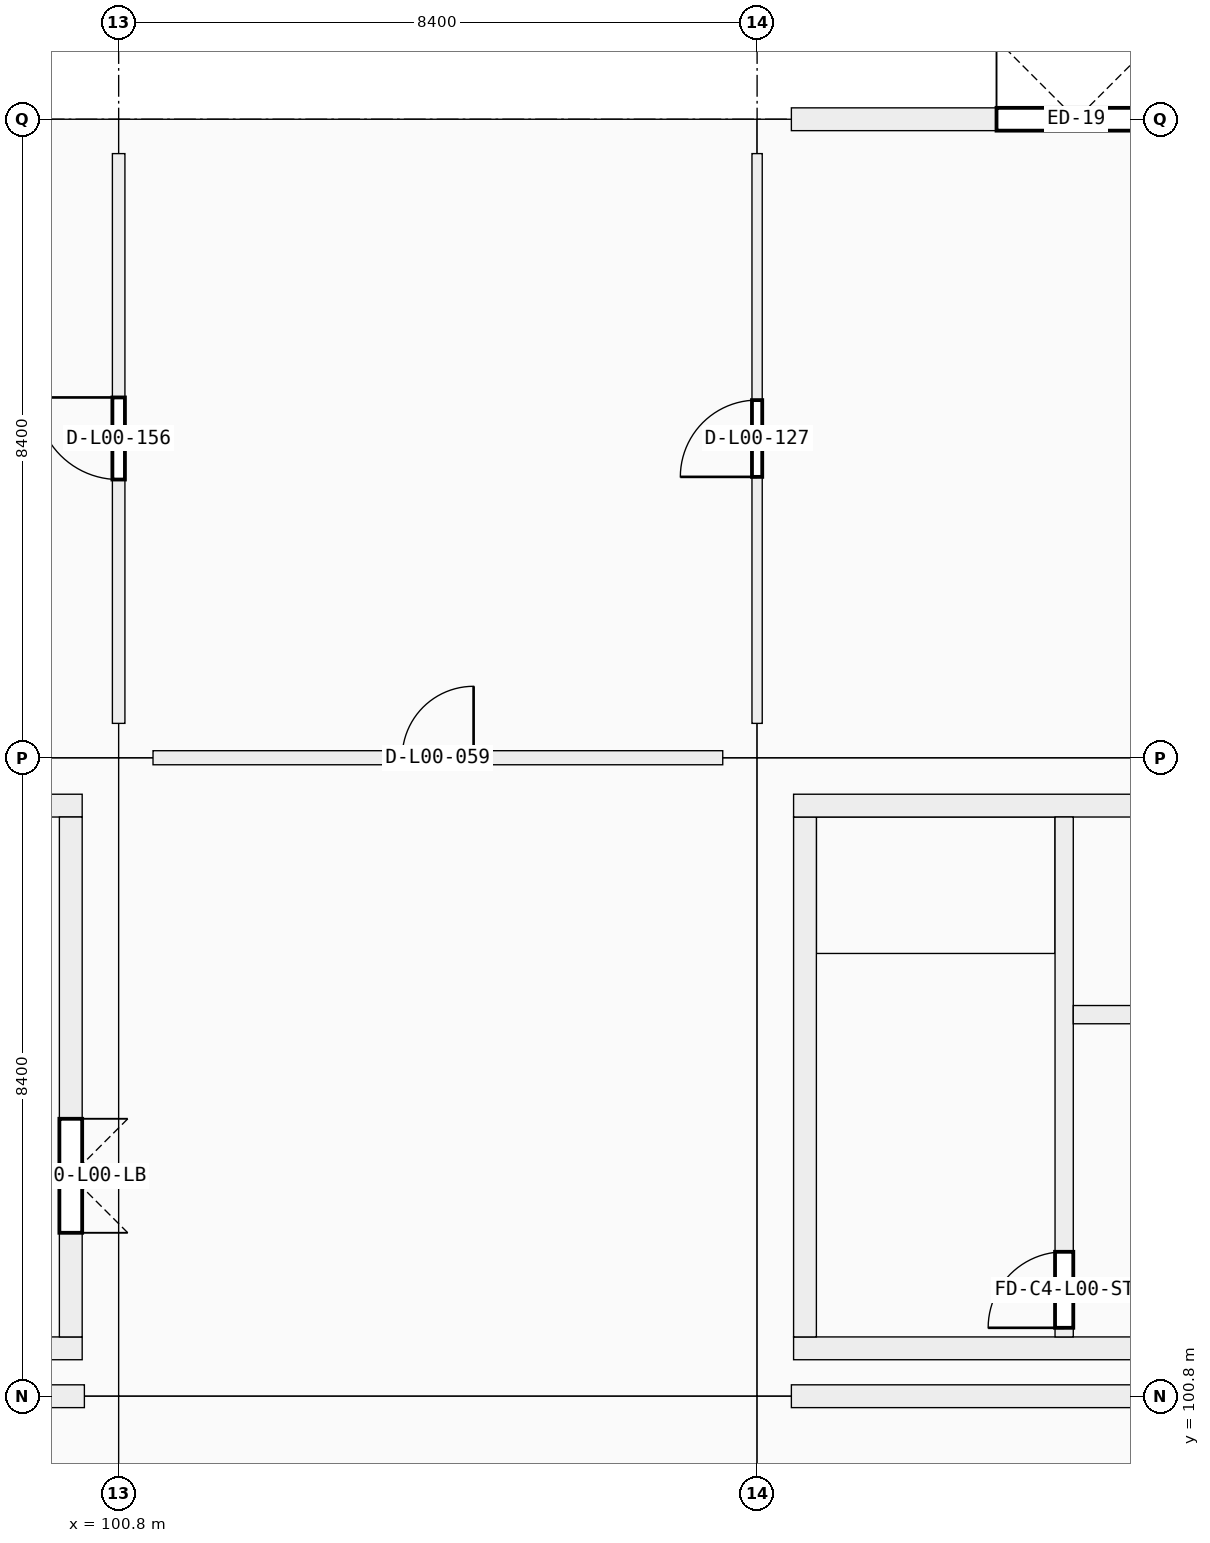
"""IFC4 building model, lengths in metres.
Left out: names, types, materials, properties, quantities, classifications, styles, units other than length and angle.
Written with IfcOpenShell. Run it as: python <this file> out.ifc"""

import sys

from ifc_helpers import new_model, si_unit, direction, frame, frame_2d, origin, origin_2d, place, context, subcontext, project, spatial, rectangle, extrude, element, fill, save


model = new_model("IFC4")
c1 = context("Model", 3, precision=1e-05, world=origin(), true_north=direction((0.0, 1.0)))
c2 = subcontext(c1, "Body", "Model", "MODEL_VIEW")
j1 = project(units=[si_unit("LENGTHUNIT", "METRE"), si_unit("PLANEANGLEUNIT", "RADIAN")], contexts=[c1])
p1 = place(None, origin())
s1 = spatial("IfcSite", under=j1, at=p1, CompositionType="ELEMENT")
p2 = place(p1, origin())
s2 = spatial("IfcBuilding", under=s1, at=p2, CompositionType="ELEMENT")
p3 = place(p2, origin())
s3 = spatial("IfcBuildingStorey", under=s2, at=p3, CompositionType="ELEMENT", Elevation=0.0)
for number, where, z_axis, x_axis in (
    (1, (100.8, 100.8, 0.0), (0.0, 0.0, 1.0), (1.0, 0.0, 0.0)),
    (2, (100.8, 109.2, 0.0), (0.0, 0.0, 1.0), (1.0, 0.0, 0.0)),
    (3, (100.8, 117.6, 0.0), (0.0, 0.0, 1.0), (1.0, 0.0, 0.0)),
    (4, (109.2, 100.8, 0.0), (0.0, 0.0, 1.0), (1.0, 0.0, 0.0)),
    (5, (109.2, 109.2, 0.0), (0.0, 0.0, 1.0), (1.0, 0.0, 0.0)),
    (6, (109.2, 117.6, 0.0), (0.0, 0.0, 1.0), (1.0, 0.0, 0.0)),
):
    element("IfcColumn", number, at=place(p3, frame(where, z_axis=z_axis, x_axis=x_axis)), inside=s3, PredefinedType="COLUMN", context=c2, shape_type="SweptSolid", body=[
        extrude(rectangle(XDim=0.9, YDim=0.9, at=origin_2d()), origin(), (0.0, 0.0, 1.0), 5.76),
    ])
for number, where, z_axis, x_axis in (
    (7, (100.349, 100.8, 0.0), (0.0, 0.0, 1.0), (-1.0, 0.0, 0.0)),
    (8, (117.149, 100.8, 0.0), (0.0, 0.0, 1.0), (-1.0, 0.0, 0.0)),
):
    element("IfcWall", number, at=place(p3, frame(where, z_axis=z_axis, x_axis=x_axis)), inside=s3, PredefinedType="SOLIDWALL", context=c2, shape_type="SweptSolid", body=[
        extrude(rectangle(XDim=7.498, YDim=0.3, at=frame_2d((3.749, 0.0))), origin(), (0.0, 0.0, 1.0), 4.7),
    ])
p4 = place(p3, frame((109.651, 117.6, 0.0), z_axis=(0.0, 0.0, 1.0), x_axis=(1.0, 0.0, 0.0)))
e9 = element("IfcWall", 9, at=p4, inside=s3, PredefinedType="SOLIDWALL", context=c2, shape_type="SweptSolid", body=[
    extrude(rectangle(XDim=7.498, YDim=0.3, at=frame_2d((3.749, 0.0))), origin(), (0.0, 0.0, 1.0), 4.7),
])
p5 = place(p4, frame((2.699, 0.0, 0.0)))
e10 = element("IfcOpeningElement", 10, at=p5, cuts=e9, PredefinedType="OPENING", context=c2, shape_type="SweptSolid", body=[
    extrude(rectangle(XDim=2.1, YDim=2.25, at=frame_2d((1.05, 1.125))), frame((0.0, 0.15, 0.0), z_axis=(0.0, -1.0, 0.0), x_axis=(1.0, 0.0, 0.0)), (0.0, 0.0, 1.0), 0.3),
])
p6 = place(p3, frame((117.12, 101.43, 0.0), z_axis=(0.0, 0.0, 1.0), x_axis=(-1.0, 0.0, 0.0)))
e11 = element("IfcWall", 11, at=p6, inside=s3, PredefinedType="SHEAR", context=c2, shape_type="SweptSolid", body=[
    extrude(rectangle(XDim=7.44, YDim=0.3, at=frame_2d((3.72, 0.0))), origin(), (0.0, 0.0, 1.0), 5.76),
])
p7 = place(p3, frame((109.83, 101.58, 0.0), z_axis=(0.0, 0.0, 1.0), x_axis=(0.0, 1.0, 0.0)))
e12 = element("IfcWall", 12, at=p7, inside=s3, PredefinedType="SHEAR", context=c2, shape_type="SweptSolid", body=[
    extrude(rectangle(XDim=6.84, YDim=0.3, at=frame_2d((3.42, 0.0))), origin(), (0.0, 0.0, 1.0), 5.76),
])
p8 = place(p3, frame((109.68, 108.57, 0.0), z_axis=(0.0, 0.0, 1.0), x_axis=(1.0, 0.0, 0.0)))
e13 = element("IfcWall", 13, at=p8, inside=s3, PredefinedType="SHEAR", context=c2, shape_type="SweptSolid", body=[
    extrude(rectangle(XDim=7.44, YDim=0.3, at=frame_2d((3.72, 0.0))), origin(), (0.0, 0.0, 1.0), 5.76),
])
p9 = place(p3, frame((113.24, 101.58, 0.0), z_axis=(0.0, 0.0, 1.0), x_axis=(0.0, 1.0, 0.0)))
e14 = element("IfcWall", 14, at=p9, inside=s3, PredefinedType="SHEAR", context=c2, shape_type="SweptSolid", body=[
    extrude(rectangle(XDim=6.84, YDim=0.24, at=frame_2d((3.42, 0.0))), origin(), (0.0, 0.0, 1.0), 5.76),
])
p10 = place(p9, frame((0.12, 0.0, 0.0)))
e15 = element("IfcOpeningElement", 15, at=p10, cuts=e14, PredefinedType="OPENING", context=c2, shape_type="SweptSolid", body=[
    extrude(rectangle(XDim=1.0, YDim=2.15, at=frame_2d((0.5, 1.075))), frame((0.0, 0.12, 0.0), z_axis=(0.0, -1.0, 0.0), x_axis=(1.0, 0.0, 0.0)), (0.0, 0.0, 1.0), 0.24),
])
p11 = place(p3, frame((113.36, 105.82, 0.0), z_axis=(0.0, 0.0, 1.0), x_axis=(1.0, 0.0, 0.0)))
e16 = element("IfcWall", 16, at=p11, inside=s3, PredefinedType="SHEAR", context=c2, shape_type="SweptSolid", body=[
    extrude(rectangle(XDim=3.46, YDim=0.24, at=frame_2d((1.73, 0.0))), origin(), (0.0, 0.0, 1.0), 5.76),
])
p12 = place(p11, frame((1.13, 0.0, 0.0)))
e17 = element("IfcOpeningElement", 17, at=p12, cuts=e16, PredefinedType="OPENING", context=c2, shape_type="SweptSolid", body=[
    extrude(rectangle(XDim=1.2, YDim=2.2, at=frame_2d((0.6, 1.1))), frame((0.0, 0.12, 0.0), z_axis=(0.0, -1.0, 0.0), x_axis=(1.0, 0.0, 0.0)), (0.0, 0.0, 1.0), 0.24),
])
for number, where, z_axis, x_axis in (
    (18, (100.32, 101.43, 0.0), (0.0, 0.0, 1.0), (-1.0, 0.0, 0.0)),
    (19, (92.88, 108.57, 0.0), (0.0, 0.0, 1.0), (1.0, 0.0, 0.0)),
):
    element("IfcWall", number, at=place(p3, frame(where, z_axis=z_axis, x_axis=x_axis)), inside=s3, PredefinedType="SHEAR", context=c2, shape_type="SweptSolid", body=[
        extrude(rectangle(XDim=7.44, YDim=0.3, at=frame_2d((3.72, 0.0))), origin(), (0.0, 0.0, 1.0), 5.76),
    ])
p13 = place(p3, frame((100.17, 108.42, 0.0), z_axis=(0.0, 0.0, 1.0), x_axis=(0.0, -1.0, 0.0)))
e20 = element("IfcWall", 20, at=p13, inside=s3, PredefinedType="SHEAR", context=c2, shape_type="SweptSolid", body=[
    extrude(rectangle(XDim=6.84, YDim=0.3, at=frame_2d((3.42, 0.0))), origin(), (0.0, 0.0, 1.0), 5.76),
])
p14 = place(p13, frame((3.97, 0.0, 0.0)))
e21 = element("IfcOpeningElement", 21, at=p14, cuts=e20, PredefinedType="OPENING", context=c2, shape_type="SweptSolid", body=[
    extrude(rectangle(XDim=1.5, YDim=2.15, at=frame_2d((0.75, 1.075))), frame((0.0, 0.15, 0.0), z_axis=(0.0, -1.0, 0.0), x_axis=(1.0, 0.0, 0.0)), (0.0, 0.0, 1.0), 0.3),
])
p15 = place(p3, frame((101.252, 109.2, 0.0), z_axis=(0.0, 0.0, 1.0), x_axis=(1.0, 0.0, 0.0)))
e22 = element("IfcWall", 22, at=p15, inside=s3, PredefinedType="PARTITIONING", context=c2, shape_type="SweptSolid", body=[
    extrude(rectangle(XDim=7.496, YDim=0.185, at=frame_2d((3.748, 0.0))), origin(), (0.0, 0.0, 1.0), 3.66),
])
p16 = place(p15, frame((3.278, 0.0, 0.0)))
e23 = element("IfcOpeningElement", 23, at=p16, cuts=e22, PredefinedType="OPENING", context=c2, shape_type="SweptSolid", body=[
    extrude(rectangle(XDim=0.94, YDim=2.15, at=frame_2d((0.47, 1.075))), frame((0.0, 0.093, 0.0), z_axis=(0.0, -1.0, 0.0), x_axis=(1.0, 0.0, 0.0)), (0.0, 0.0, 1.0), 0.185),
])
p17 = place(p3, frame((100.8, 109.652, 0.0), z_axis=(0.0, 0.0, 1.0), x_axis=(0.0, 1.0, 0.0)))
e24 = element("IfcWall", 24, at=p17, inside=s3, PredefinedType="PARTITIONING", context=c2, shape_type="SweptSolid", body=[
    extrude(rectangle(XDim=7.496, YDim=0.165, at=frame_2d((3.748, 0.0))), origin(), (0.0, 0.0, 1.0), 3.66),
])
p18 = place(p17, frame((3.208, 0.0, 0.0)))
e25 = element("IfcOpeningElement", 25, at=p18, cuts=e24, PredefinedType="OPENING", context=c2, shape_type="SweptSolid", body=[
    extrude(rectangle(XDim=1.08, YDim=2.25, at=frame_2d((0.54, 1.125))), frame((0.0, 0.083, 0.0), z_axis=(0.0, -1.0, 0.0), x_axis=(1.0, 0.0, 0.0)), (0.0, 0.0, 1.0), 0.165),
])
p19 = place(p3, frame((109.2, 109.652, 0.0), z_axis=(0.0, 0.0, 1.0), x_axis=(0.0, 1.0, 0.0)))
e26 = element("IfcWall", 26, at=p19, inside=s3, PredefinedType="PARTITIONING", context=c2, shape_type="SweptSolid", body=[
    extrude(rectangle(XDim=7.496, YDim=0.135, at=frame_2d((3.748, 0.0))), origin(), (0.0, 0.0, 1.0), 3.66),
])
p20 = place(p19, frame((3.243, 0.0, 0.0)))
e27 = element("IfcOpeningElement", 27, at=p20, cuts=e26, PredefinedType="OPENING", context=c2, shape_type="SweptSolid", body=[
    extrude(rectangle(XDim=1.01, YDim=2.12, at=frame_2d((0.505, 1.06))), frame((0.0, 0.067, 0.0), z_axis=(0.0, -1.0, 0.0), x_axis=(1.0, 0.0, 0.0)), (0.0, 0.0, 1.0), 0.135),
])
p21 = place(p5, origin())
e28 = element("IfcDoor", 28, at=p21, inside=s3, OperationType="DOUBLE_DOOR_SINGLE_SWING", PredefinedType="DOOR", context=c2, shape_type="SweptSolid", body=[
    extrude(rectangle(XDim=2.1, YDim=2.25, at=frame_2d((1.05, 1.125))), frame((0.0, 0.025, 0.0), z_axis=(0.0, -1.0, 0.0), x_axis=(1.0, 0.0, 0.0)), (0.0, 0.0, 1.0), 0.05),
])
fill(e10, e28)
p22 = place(p10, origin())
e29 = element("IfcDoor", 29, at=p22, inside=s3, OperationType="SINGLE_SWING_LEFT", PredefinedType="DOOR", context=c2, shape_type="SweptSolid", body=[
    extrude(rectangle(XDim=1.0, YDim=2.15, at=frame_2d((0.5, 1.075))), frame((0.0, 0.025, 0.0), z_axis=(0.0, -1.0, 0.0), x_axis=(1.0, 0.0, 0.0)), (0.0, 0.0, 1.0), 0.05),
])
fill(e15, e29)
p23 = place(p14, origin())
e30 = element("IfcDoor", 30, at=p23, inside=s3, OperationType="DOUBLE_DOOR_SINGLE_SWING", PredefinedType="DOOR", context=c2, shape_type="SweptSolid", body=[
    extrude(rectangle(XDim=1.5, YDim=2.15, at=frame_2d((0.75, 1.075))), frame((0.0, 0.025, 0.0), z_axis=(0.0, -1.0, 0.0), x_axis=(1.0, 0.0, 0.0)), (0.0, 0.0, 1.0), 0.05),
])
fill(e21, e30)
p24 = place(p16, origin())
e31 = element("IfcDoor", 31, at=p24, inside=s3, OperationType="SINGLE_SWING_RIGHT", PredefinedType="DOOR", context=c2, shape_type="SweptSolid", body=[
    extrude(rectangle(XDim=0.94, YDim=2.15, at=frame_2d((0.47, 1.075))), frame((0.0, 0.025, 0.0), z_axis=(0.0, -1.0, 0.0), x_axis=(1.0, 0.0, 0.0)), (0.0, 0.0, 1.0), 0.05),
])
fill(e23, e31)
p25 = place(p20, origin())
e32 = element("IfcDoor", 32, at=p25, inside=s3, OperationType="SINGLE_SWING_LEFT", PredefinedType="DOOR", context=c2, shape_type="SweptSolid", body=[
    extrude(rectangle(XDim=1.01, YDim=2.12, at=frame_2d((0.505, 1.06))), frame((0.0, 0.025, 0.0), z_axis=(0.0, -1.0, 0.0), x_axis=(1.0, 0.0, 0.0)), (0.0, 0.0, 1.0), 0.05),
])
fill(e27, e32)
p26 = place(p18, origin())
e33 = element("IfcDoor", 33, at=p26, inside=s3, OperationType="SINGLE_SWING_RIGHT", PredefinedType="DOOR", context=c2, shape_type="SweptSolid", body=[
    extrude(rectangle(XDim=1.08, YDim=2.25, at=frame_2d((0.54, 1.125))), frame((0.0, 0.025, 0.0), z_axis=(0.0, -1.0, 0.0), x_axis=(1.0, 0.0, 0.0)), (0.0, 0.0, 1.0), 0.05),
])
fill(e25, e33)
save(model, sys.argv[1])
